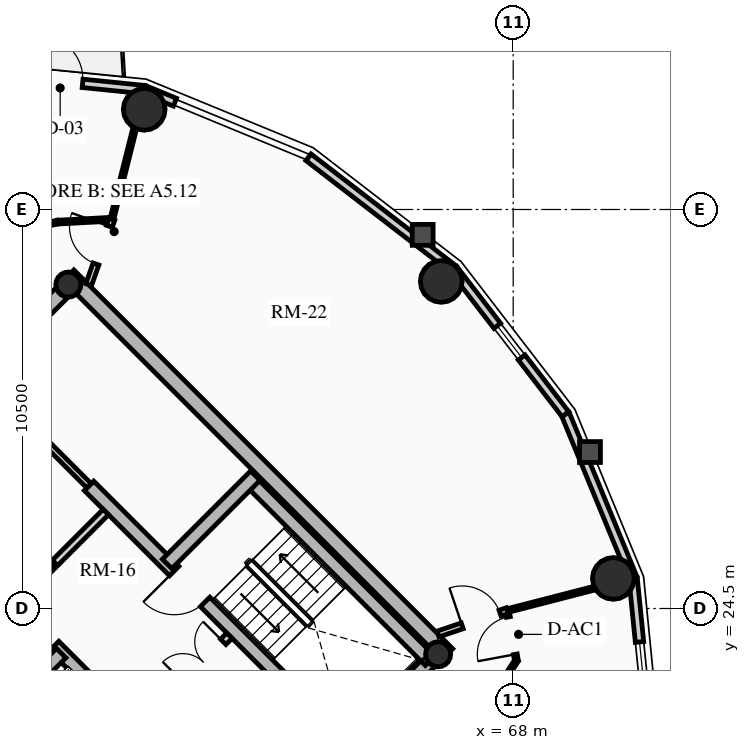
"""IFC4 building model, lengths in metres.
Left out: names, types, materials, properties, quantities, classifications, styles, units other than length and angle.
Written with IfcOpenShell. Run it as: python <this file> out.ifc"""

import sys

from ifc_helpers import new_model, si_unit, direction, frame, frame_2d, origin, origin_2d, place, context, subcontext, project, spatial, rectangle, circle, hollow_circle, extrude, source, transform, mapped, element, fill, save


model = new_model("IFC4")
c1 = context("Model", 3, precision=1e-05, world=origin(), true_north=direction((0.0, 1.0)))
c2 = subcontext(c1, "Body", "Model", "MODEL_VIEW")
j1 = project(units=[si_unit("LENGTHUNIT", "METRE"), si_unit("PLANEANGLEUNIT", "RADIAN")], contexts=[c1])
p1 = place(None, origin())
s1 = spatial("IfcSite", under=j1, at=p1, CompositionType="ELEMENT")
p2 = place(p1, origin())
s2 = spatial("IfcBuilding", under=s1, at=p2, CompositionType="ELEMENT")
p3 = place(p2, frame((0.0, 0.0, 199.57)))
s3 = spatial("IfcBuildingStorey", under=s2, at=p3, CompositionType="ELEMENT", Elevation=199.57)
for number, where, z_axis, x_axis in (
    (1, (58.702, 15.732, 0.0), (0.0, 0.0, 1.0), (-0.707, 0.707, 0.0)),
    (2, (66.268, 23.298, 0.0), (0.0, 0.0, 1.0), (-0.707, 0.707, 0.0)),
):
    element("IfcWall", number, at=place(p3, frame(where, z_axis=z_axis, x_axis=x_axis)), inside=s3, PredefinedType="SHEAR", context=c2, shape_type="SweptSolid", body=[
        extrude(rectangle(XDim=14.1, YDim=0.4, at=frame_2d((7.05, 0.0))), origin(), (0.0, 0.0, 1.0), 2.91),
    ])
p4 = place(p3, frame((58.561, 15.873, 0.0), z_axis=(0.0, 0.0, 1.0), x_axis=(0.707106781187, 0.707106781187, 0.0)))
e3 = element("IfcWall", 3, at=p4, inside=s3, PredefinedType="SHEAR", context=c2, shape_type="SweptSolid", body=[
    extrude(rectangle(XDim=10.7, YDim=0.4, at=frame_2d((5.35, 0.0))), origin(), (0.0, 0.0, 1.0), 2.91),
])
m1 = source(origin(), c2, "Body", "SweptSolid", [
    extrude(rectangle(XDim=1.5, YDim=2.02, at=frame_2d((0.75, 1.01))), frame((0.0, 0.21, 0.0), z_axis=(0.0, -1.0, 0.0), x_axis=(1.0, 0.0, 0.0)), (0.0, 0.0, 1.0), 0.42),
])
p5 = place(p4, frame((5.45, 0.0, 0.0)))
e4 = element("IfcOpeningElement", 4, at=p5, cuts=e3, PredefinedType="OPENING", context=c2, shape_type="MappedRepresentation", body=[
    mapped(m1, transform((0.0, 0.0, 0.0), x_axis=(1.0, 0.0, 0.0), y_axis=(0.0, 1.0, 0.0), z_axis=(0.0, 0.0, 1.0), scale=1.0)),
])
p6 = place(p3, frame((48.873, 25.561, 0.0), z_axis=(0.0, 0.0, 1.0), x_axis=(0.707106781187, 0.707106781187, 0.0)))
e5 = element("IfcWall", 5, at=p6, inside=s3, PredefinedType="SHEAR", context=c2, shape_type="SweptSolid", body=[
    extrude(rectangle(XDim=10.7, YDim=0.4, at=frame_2d((5.35, 0.0))), origin(), (0.0, 0.0, 1.0), 2.91),
])
p7 = place(p6, frame((4.6, 0.0, 0.0)))
e6 = element("IfcOpeningElement", 6, at=p7, cuts=e5, PredefinedType="OPENING", context=c2, shape_type="MappedRepresentation", body=[
    mapped(m1, transform((0.0, 0.0, 0.0), x_axis=(1.0, 0.0, 0.0), y_axis=(0.0, 1.0, 0.0), z_axis=(0.0, 0.0, 1.0), scale=1.0)),
])
p8 = place(p3, frame((61.06, 18.373, 0.0), z_axis=(0.0, 0.0, 1.0), x_axis=(-0.707106781187, 0.707106781187, 0.0)))
e7 = element("IfcWall", 7, at=p8, inside=s3, PredefinedType="SHEAR", context=c2, shape_type="SweptSolid", body=[
    extrude(rectangle(XDim=13.7, YDim=0.35, at=frame_2d((6.85, 0.0))), origin(), (0.0, 0.0, 1.0), 2.91),
])
m2 = source(origin(), c2, "Body", "SweptSolid", [
    extrude(rectangle(XDim=1.1, YDim=2.015, at=frame_2d((0.55, 1.007))), frame((0.0, 0.185, 0.0), z_axis=(0.0, -1.0, 0.0), x_axis=(1.0, 0.0, 0.0)), (0.0, 0.0, 1.0), 0.37),
])
p9 = place(p8, frame((4.85, 0.0, 0.0)))
e8 = element("IfcOpeningElement", 8, at=p9, cuts=e7, PredefinedType="OPENING", context=c2, shape_type="MappedRepresentation", body=[
    mapped(m2, transform((0.0, 0.0, 0.0), x_axis=(1.0, 0.0, 0.0), y_axis=(0.0, 1.0, 0.0), z_axis=(0.0, 0.0, 1.0), scale=1.0)),
])
p10 = place(p8, frame((0.625, 0.0, 0.0)))
e9 = element("IfcOpeningElement", 9, at=p10, cuts=e7, PredefinedType="OPENING", context=c2, shape_type="MappedRepresentation", body=[
    mapped(m2, transform((0.0, 0.0, 0.0), x_axis=(1.0, 0.0, 0.0), y_axis=(0.0, 1.0, 0.0), z_axis=(0.0, 0.0, 1.0), scale=1.0)),
])
p11 = place(p8, frame((2.625, 0.0, 0.0)))
e10 = element("IfcOpeningElement", 10, at=p11, cuts=e7, PredefinedType="OPENING", context=c2, shape_type="MappedRepresentation", body=[
    mapped(m2, transform((0.0, 0.0, 0.0), x_axis=(1.0, 0.0, 0.0), y_axis=(0.0, 1.0, 0.0), z_axis=(0.0, 0.0, 1.0), scale=1.0)),
])
m3 = source(origin(), c2, "Body", "SweptSolid", [
    extrude(rectangle(XDim=1.15, YDim=2.02, at=frame_2d((0.575, 1.01))), frame((0.0, 0.185, 0.0), z_axis=(0.0, -1.0, 0.0), x_axis=(1.0, 0.0, 0.0)), (0.0, 0.0, 1.0), 0.37),
])
p12 = place(p8, frame((7.27, 0.0, 0.0)))
e11 = element("IfcOpeningElement", 11, at=p12, cuts=e7, PredefinedType="OPENING", context=c2, shape_type="MappedRepresentation", body=[
    mapped(m3, transform((0.0, 0.0, 0.0), x_axis=(1.0, 0.0, 0.0), y_axis=(0.0, 1.0, 0.0), z_axis=(0.0, 0.0, 1.0), scale=1.0)),
])
p13 = place(p3, frame((63.627, 20.94, 0.0), z_axis=(0.0, 0.0, 1.0), x_axis=(-0.707119496762, 0.707094065383, 0.0)))
e12 = element("IfcWall", 12, at=p13, inside=s3, PredefinedType="SHEAR", context=c2, shape_type="SweptSolid", body=[
    extrude(rectangle(XDim=9.6, YDim=0.35, at=frame_2d((4.8, 0.0))), origin(), (0.0, 0.0, 1.0), 2.91),
])
p14 = place(p13, frame((5.28, 0.0, 0.0)))
e13 = element("IfcOpeningElement", 13, at=p14, cuts=e12, PredefinedType="OPENING", context=c2, shape_type="MappedRepresentation", body=[
    mapped(m3, transform((0.0, 0.0, 0.0), x_axis=(1.0, 0.0, 0.0), y_axis=(0.0, 1.0, 0.0), z_axis=(0.0, 0.0, 1.0), scale=1.0)),
])
p15 = place(p3, frame((53.784, 21.003, 0.0), z_axis=(0.0, 0.0, 1.0), x_axis=(0.707106781187, 0.707106781187, 0.0)))
e14 = element("IfcWall", 14, at=p15, inside=s3, PredefinedType="SHEAR", context=c2, shape_type="SweptSolid", body=[
    extrude(rectangle(XDim=3.285, YDim=0.35, at=frame_2d((1.643, 0.0))), origin(), (0.0, 0.0, 1.0), 2.91),
])
p16 = place(p3, frame((65.812, 23.125, 0.0), z_axis=(0.0, 0.0, 1.0), x_axis=(-0.707106781187, 0.707106781187, 0.0)))
e15 = element("IfcWall", 15, at=p16, inside=s3, PredefinedType="SHEAR", context=c2, shape_type="SweptSolid", body=[
    extrude(rectangle(XDim=6.695, YDim=0.35, at=frame_2d((3.348, 0.0))), origin(), (0.0, 0.0, 1.0), 2.91),
])
p17 = place(p3, frame((58.893, 25.674, 0.0), z_axis=(0.0, 0.0, 1.0), x_axis=(0.707106781187, 0.707106781187, 0.0)))
e16 = element("IfcWall", 16, at=p17, inside=s3, PredefinedType="SHEAR", context=c2, shape_type="SweptSolid", body=[
    extrude(rectangle(XDim=3.285, YDim=0.35, at=frame_2d((1.643, 0.0))), origin(), (0.0, 0.0, 1.0), 2.91),
])
for number, where, z_axis, x_axis in (
    (17, (66.024, 23.294, 0.0), (0.0, 0.0, 1.0), (0.707, 0.707, 0.0)),
    (18, (56.294, 33.024, 0.0), (0.0, 0.0, 1.0), (0.707, 0.707, 0.0)),
):
    element("IfcColumn", number, at=place(p3, frame(where, z_axis=z_axis, x_axis=x_axis)), inside=s3, PredefinedType="COLUMN", context=c2, shape_type="SweptSolid", body=[
        extrude(hollow_circle(Radius=0.33, WallThickness=0.025, at=origin_2d()), origin(), (0.0, 0.0, 1.0), 2.91),
    ])
for number, where, z_axis, x_axis in (
    (19, (66.107, 33.107, 0.0), (0.0, 0.0, 1.0), (1.0, 0.0, 0.0)),
    (20, (58.291, 37.635, 0.0), (0.0, 0.0, 1.0), (1.0, 0.0, 0.0)),
    (21, (70.635, 25.291, 0.0), (0.0, 0.0, 1.0), (1.0, 0.0, 0.0)),
):
    element("IfcColumn", number, at=place(p3, frame(where, z_axis=z_axis, x_axis=x_axis)), inside=s3, PredefinedType="USERDEFINED", context=c2, shape_type="SweptSolid", body=[
        extrude(circle(Radius=0.55, at=origin_2d()), origin(), (0.0, 0.0, 1.0), 2.91),
    ])
p18 = place(p3, frame((62.613, 36.374, 0.0), z_axis=(0.0, 0.0, 1.0), x_axis=(0.791998462147, -0.610523083886, 0.0)))
e22 = element("IfcWall", 22, at=p18, inside=s3, PredefinedType="SOLIDWALL", context=c2, shape_type="SweptSolid", body=[
    extrude(rectangle(XDim=4.82, YDim=0.22, at=frame_2d((2.41, 0.0))), origin(), (0.0, 0.0, 1.0), 2.322),
])
p19 = place(p3, frame((58.295, 38.155, 0.0), z_axis=(0.0, 0.0, 1.0), x_axis=(0.924515260676, -0.381145028536, 0.0)))
e23 = element("IfcWall", 23, at=p19, inside=s3, PredefinedType="SOLIDWALL", context=c2, shape_type="SweptSolid", body=[
    extrude(rectangle(XDim=0.87, YDim=0.22, at=frame_2d((0.435, 0.0))), origin(), (0.0, 0.0, 1.0), 2.322),
])
p20 = place(p3, frame((53.9, 38.599, 0.0), z_axis=(0.0, 0.0, 1.0), x_axis=(0.994929930991, -0.100570534541, 0.0)))
e24 = element("IfcWall", 24, at=p20, inside=s3, PredefinedType="SOLIDWALL", context=c2, shape_type="SweptSolid", body=[
    extrude(rectangle(XDim=4.418, YDim=0.22, at=frame_2d((2.209, 0.0))), origin(), (0.0, 0.0, 1.0), 2.322),
])
m4 = source(origin(), c2, "Body", "SweptSolid", [
    extrude(rectangle(XDim=1.15, YDim=2.005, at=frame_2d((0.575, 1.002))), frame((0.0, 0.12, 0.0), z_axis=(0.0, -1.0, 0.0), x_axis=(1.0, 0.0, 0.0)), (0.0, 0.0, 1.0), 0.24),
])
p21 = place(p20, frame((1.634, 0.0, 0.0)))
e25 = element("IfcOpeningElement", 25, at=p21, cuts=e24, PredefinedType="OPENING", context=c2, shape_type="MappedRepresentation", body=[
    mapped(m4, transform((0.0, 0.0, 0.0), x_axis=(1.0, 0.0, 0.0), y_axis=(0.0, 1.0, 0.0), z_axis=(0.0, 0.0, 1.0), scale=1.0)),
])
p22 = place(p3, frame((71.155, 25.295, 0.0), z_axis=(0.0, 0.0, 1.0), x_axis=(0.100570534541, -0.994929930991, 0.0)))
e26 = element("IfcWall", 26, at=p22, inside=s3, PredefinedType="SOLIDWALL", context=c2, shape_type="SweptSolid", body=[
    extrude(rectangle(XDim=4.418, YDim=0.22, at=frame_2d((2.209, 0.0))), origin(), (0.0, 0.0, 1.0), 2.322),
])
m5 = source(origin(), c2, "Body", "SweptSolid", [
    extrude(rectangle(XDim=1.05, YDim=1.3, at=frame_2d((0.525, 0.65))), frame((0.0, 0.12, 0.0), z_axis=(0.0, -1.0, 0.0), x_axis=(1.0, 0.0, 0.0)), (0.0, 0.0, 1.0), 0.24),
])
p23 = place(p22, frame((1.684, 0.0, 0.65)))
e27 = element("IfcOpeningElement", 27, at=p23, cuts=e26, PredefinedType="OPENING", context=c2, shape_type="MappedRepresentation", body=[
    mapped(m5, transform((0.0, 0.0, 0.0), x_axis=(1.0, 0.0, 0.0), y_axis=(0.0, 1.0, 0.0), z_axis=(0.0, 0.0, 1.0), scale=1.0)),
])
p24 = place(p3, frame((69.374, 29.613, 0.0), z_axis=(0.0, 0.0, 1.0), x_axis=(0.381309704956, -0.924447353237, 0.0)))
e28 = element("IfcWall", 28, at=p24, inside=s3, PredefinedType="SOLIDWALL", context=c2, shape_type="SweptSolid", body=[
    extrude(rectangle(XDim=4.671, YDim=0.22, at=frame_2d((2.335, 0.0))), origin(), (0.0, 0.0, 1.0), 2.322),
])
p25 = place(p3, frame((66.431, 33.431, 0.0), z_axis=(0.0, 0.0, 1.0), x_axis=(0.610523083886, -0.791998462147, 0.0)))
e29 = element("IfcWall", 29, at=p25, inside=s3, PredefinedType="SOLIDWALL", context=c2, shape_type="SweptSolid", body=[
    extrude(rectangle(XDim=4.82, YDim=0.22, at=frame_2d((2.41, 0.0))), origin(), (0.0, 0.0, 1.0), 2.322),
])
p26 = place(p25, frame((1.885, 0.0, 0.65)))
e30 = element("IfcOpeningElement", 30, at=p26, cuts=e29, PredefinedType="OPENING", context=c2, shape_type="MappedRepresentation", body=[
    mapped(m5, transform((0.0, 0.0, 0.0), x_axis=(1.0, 0.0, 0.0), y_axis=(0.0, 1.0, 0.0), z_axis=(0.0, 0.0, 1.0), scale=1.0)),
])
p27 = place(p3, frame((58.214, 21.467, 0.0), z_axis=(0.0, 0.0, 1.0), x_axis=(0.707106781187, 0.707106781187, 0.0)))
e31 = element("IfcWall", 31, at=p27, inside=s3, PredefinedType="PARTITIONING", context=c2, shape_type="SweptSolid", body=[
    extrude(rectangle(XDim=3.28, YDim=0.2, at=frame_2d((1.64, 0.0))), origin(), (0.0, 0.0, 1.0), 2.685),
])
m6 = source(origin(), c2, "Body", "SweptSolid", [
    extrude(rectangle(XDim=1.5, YDim=2.02, at=frame_2d((0.75, 1.01))), frame((0.0, 0.11, 0.0), z_axis=(0.0, -1.0, 0.0), x_axis=(1.0, 0.0, 0.0)), (0.0, 0.0, 1.0), 0.22),
])
p28 = place(p27, frame((1.55, 0.0, 0.0)))
e32 = element("IfcOpeningElement", 32, at=p28, cuts=e31, PredefinedType="OPENING", context=c2, shape_type="MappedRepresentation", body=[
    mapped(m6, transform((0.0, 0.0, 0.0), x_axis=(1.0, 0.0, 0.0), y_axis=(0.0, 1.0, 0.0), z_axis=(0.0, 0.0, 1.0), scale=1.0)),
])
p29 = place(p3, frame((54.961, 24.719, 0.0), z_axis=(0.0, 0.0, 1.0), x_axis=(0.707106781187, 0.707106781187, 0.0)))
e33 = element("IfcWall", 33, at=p29, inside=s3, PredefinedType="PARTITIONING", context=c2, shape_type="SweptSolid", body=[
    extrude(rectangle(XDim=3.28, YDim=0.2, at=frame_2d((1.64, 0.0))), origin(), (0.0, 0.0, 1.0), 2.685),
])
m7 = source(origin(), c2, "Body", "SweptSolid", [
    extrude(rectangle(XDim=0.9, YDim=2.005, at=frame_2d((0.45, 1.002))), frame((0.0, 0.11, 0.0), z_axis=(0.0, -1.0, 0.0), x_axis=(1.0, 0.0, 0.0)), (0.0, 0.0, 1.0), 0.22),
])
p30 = place(p29, frame((0.16, 0.0, 0.0)))
e34 = element("IfcOpeningElement", 34, at=p30, cuts=e33, PredefinedType="OPENING", context=c2, shape_type="MappedRepresentation", body=[
    mapped(m7, transform((0.0, 0.0, 0.0), x_axis=(1.0, 0.0, 0.0), y_axis=(0.0, 1.0, 0.0), z_axis=(0.0, 0.0, 1.0), scale=1.0)),
])
p31 = place(p3, frame((55.874, 25.631, 0.0), z_axis=(0.0, 0.0, 1.0), x_axis=(-0.707157639372, 0.707055919343, 0.0)))
e35 = element("IfcWall", 35, at=p31, inside=s3, PredefinedType="PARTITIONING", context=c2, shape_type="SweptSolid", body=[
    extrude(rectangle(XDim=2.4, YDim=0.2, at=frame_2d((1.2, 0.0))), origin(), (0.0, 0.0, 1.0), 2.685),
])
p32 = place(p3, frame((56.839, 27.728, 0.0), z_axis=(0.0, 0.0, 1.0), x_axis=(-0.707106781187, 0.707106781187, 0.0)))
e36 = element("IfcWall", 36, at=p32, inside=s3, PredefinedType="PARTITIONING", context=c2, shape_type="SweptSolid", body=[
    extrude(rectangle(XDim=3.9, YDim=0.16, at=frame_2d((1.95, 0.0))), origin(), (0.0, 0.0, 1.0), 2.685),
])
m8 = source(origin(), c2, "Body", "SweptSolid", [
    extrude(rectangle(XDim=0.9, YDim=2.005, at=frame_2d((0.45, 1.002))), frame((0.0, 0.09, 0.0), z_axis=(0.0, -1.0, 0.0), x_axis=(1.0, 0.0, 0.0)), (0.0, 0.0, 1.0), 0.18),
])
p33 = place(p32, frame((2.2, 0.0, 0.0)))
e37 = element("IfcOpeningElement", 37, at=p33, cuts=e36, PredefinedType="OPENING", context=c2, shape_type="MappedRepresentation", body=[
    mapped(m8, transform((0.0, 0.0, 0.0), x_axis=(1.0, 0.0, 0.0), y_axis=(0.0, 1.0, 0.0), z_axis=(0.0, 0.0, 1.0), scale=1.0)),
])
p34 = place(p3, frame((57.44, 34.744, 0.0), z_axis=(0.0, 0.0, 1.0), x_axis=(-0.998578025565, -0.053309725738, 0.0)))
e38 = element("IfcWall", 38, at=p34, inside=s3, PredefinedType="MOVABLE", context=c2, shape_type="SweptSolid", body=[
    extrude(rectangle(XDim=1.433, YDim=0.1, at=frame_2d((0.717, 0.0))), origin(), (0.0, 0.0, 1.0), 2.322),
])
p35 = place(p3, frame((56.009, 34.667, 0.0), z_axis=(0.0, 0.0, 1.0), x_axis=(-0.977625498152, -0.210353001795, 0.0)))
e39 = element("IfcWall", 39, at=p35, inside=s3, PredefinedType="MOVABLE", context=c2, shape_type="SweptSolid", body=[
    extrude(rectangle(XDim=1.538, YDim=0.1, at=frame_2d((0.769, 0.0))), origin(), (0.0, 0.0, 1.0), 2.255),
])
p36 = place(p3, frame((67.095, 21.6, 0.0), z_axis=(0.0, 0.0, 1.0), x_axis=(0.543773190184, 0.839232219137, 0.0)))
e40 = element("IfcWall", 40, at=p36, inside=s3, PredefinedType="MOVABLE", context=c2, shape_type="SweptSolid", body=[
    extrude(rectangle(XDim=1.823, YDim=0.1, at=frame_2d((0.911, 0.0))), origin(), (0.0, 0.0, 1.0), 2.255),
])
p37 = place(p3, frame((68.086, 23.129, 0.0), z_axis=(0.0, 0.0, 1.0), x_axis=(-0.182004193146, 0.983297754334, 0.0)))
e41 = element("IfcWall", 41, at=p37, inside=s3, PredefinedType="MOVABLE", context=c2, shape_type="SweptSolid", body=[
    extrude(rectangle(XDim=1.336, YDim=0.1, at=frame_2d((0.668, 0.0))), origin(), (0.0, 0.0, 1.0), 2.322),
])
m9 = source(origin(), c2, "Body", "SweptSolid", [
    extrude(rectangle(XDim=1.0, YDim=2.015, at=frame_2d((0.5, 1.007))), frame((0.0, 0.06, 0.0), z_axis=(0.0, -1.0, 0.0), x_axis=(1.0, 0.0, 0.0)), (0.0, 0.0, 1.0), 0.12),
])
p38 = place(p37, frame((0.168, 0.0, 0.0)))
e42 = element("IfcOpeningElement", 42, at=p38, cuts=e41, PredefinedType="OPENING", context=c2, shape_type="MappedRepresentation", body=[
    mapped(m9, transform((0.0, 0.0, 0.0), x_axis=(1.0, 0.0, 0.0), y_axis=(0.0, 1.0, 0.0), z_axis=(0.0, 0.0, 1.0), scale=1.0)),
])
p39 = place(p3, frame((57.44, 34.744, 0.0), z_axis=(0.0, 0.0, 1.0), x_axis=(0.243619816457, 0.969870808422, 0.0)))
e43 = element("IfcWall", 43, at=p39, inside=s3, PredefinedType="MOVABLE", context=c2, shape_type="SweptSolid", body=[
    extrude(rectangle(XDim=3.496, YDim=0.1, at=frame_2d((1.748, 0.0))), origin(), (0.0, 0.0, 1.0), 2.322),
])
p40 = place(p3, frame((67.843, 24.443, 0.0), z_axis=(0.0, 0.0, 1.0), x_axis=(0.968303102463, 0.249778105048, 0.0)))
e44 = element("IfcWall", 44, at=p40, inside=s3, PredefinedType="MOVABLE", context=c2, shape_type="SweptSolid", body=[
    extrude(rectangle(XDim=3.399, YDim=0.1, at=frame_2d((1.7, 0.0))), origin(), (0.0, 0.0, 1.0), 2.322),
])
p41 = place(p3, frame((56.828, 33.021, 0.0), z_axis=(0.0, 0.0, 1.0), x_axis=(0.334788446034, 0.942293317605, 0.0)))
e45 = element("IfcWall", 45, at=p41, inside=s3, PredefinedType="PARTITIONING", context=c2, shape_type="SweptSolid", body=[
    extrude(rectangle(XDim=1.829, YDim=0.16, at=frame_2d((0.915, 0.0))), origin(), (0.0, 0.0, 1.0), 2.255),
])
m10 = source(origin(), c2, "Body", "SweptSolid", [
    extrude(rectangle(XDim=1.05, YDim=2.015, at=frame_2d((0.525, 1.007))), frame((0.0, 0.09, 0.0), z_axis=(0.0, -1.0, 0.0), x_axis=(1.0, 0.0, 0.0)), (0.0, 0.0, 1.0), 0.18),
])
p42 = place(p41, frame((0.579, 0.0, 0.0)))
e46 = element("IfcOpeningElement", 46, at=p42, cuts=e45, PredefinedType="OPENING", context=c2, shape_type="MappedRepresentation", body=[
    mapped(m10, transform((0.0, 0.0, 0.0), x_axis=(1.0, 0.0, 0.0), y_axis=(0.0, 1.0, 0.0), z_axis=(0.0, 0.0, 1.0), scale=1.0)),
])
p43 = place(p3, frame((66.021, 23.828, 0.0), z_axis=(0.0, 0.0, 1.0), x_axis=(0.947522075691, 0.319690344049, 0.0)))
e47 = element("IfcWall", 47, at=p43, inside=s3, PredefinedType="PARTITIONING", context=c2, shape_type="SweptSolid", body=[
    extrude(rectangle(XDim=1.924, YDim=0.16, at=frame_2d((0.962, 0.0))), origin(), (0.0, 0.0, 1.0), 2.255),
])
p44 = place(p43, frame((0.674, 0.0, 0.0)))
e48 = element("IfcOpeningElement", 48, at=p44, cuts=e47, PredefinedType="OPENING", context=c2, shape_type="MappedRepresentation", body=[
    mapped(m10, transform((0.0, 0.0, 0.0), x_axis=(1.0, 0.0, 0.0), y_axis=(0.0, 1.0, 0.0), z_axis=(0.0, 0.0, 1.0), scale=1.0)),
])
m11 = source(origin(), c2, "Body", "SweptSolid", [
    extrude(rectangle(XDim=1.15, YDim=2.005, at=frame_2d((0.575, 1.002))), frame((0.0, 0.025, 0.0), z_axis=(0.0, -1.0, 0.0), x_axis=(1.0, 0.0, 0.0)), (0.0, 0.0, 1.0), 0.05),
])
p45 = place(p21, origin())
e49 = element("IfcDoor", 49, at=p45, inside=s3, OperationType="SINGLE_SWING_LEFT", PredefinedType="DOOR", context=c2, shape_type="MappedRepresentation", body=[
    mapped(m11, transform((0.0, 0.0, 0.0), x_axis=(1.0, 0.0, 0.0), y_axis=(0.0, 1.0, 0.0), z_axis=(0.0, 0.0, 1.0), scale=1.0)),
])
fill(e25, e49)
m12 = source(origin(), c2, "Body", "SweptSolid", [
    extrude(rectangle(XDim=1.05, YDim=1.3, at=frame_2d((0.525, 0.65))), frame((0.0, 0.03, 0.0), z_axis=(0.0, -1.0, 0.0), x_axis=(1.0, 0.0, 0.0)), (0.0, 0.0, 1.0), 0.06),
])
p46 = place(p23, origin())
e50 = element("IfcWindow", 50, at=p46, inside=s3, PartitioningType="SINGLE_PANEL", PredefinedType="WINDOW", context=c2, shape_type="MappedRepresentation", body=[
    mapped(m12, transform((0.0, 0.0, 0.0), x_axis=(1.0, 0.0, 0.0), y_axis=(0.0, 1.0, 0.0), z_axis=(0.0, 0.0, 1.0), scale=1.0)),
])
fill(e27, e50)
p47 = place(p26, origin())
e51 = element("IfcWindow", 51, at=p47, inside=s3, PartitioningType="SINGLE_PANEL", PredefinedType="WINDOW", context=c2, shape_type="MappedRepresentation", body=[
    mapped(m12, transform((0.0, 0.0, 0.0), x_axis=(1.0, 0.0, 0.0), y_axis=(0.0, 1.0, 0.0), z_axis=(0.0, 0.0, 1.0), scale=1.0)),
])
fill(e30, e51)
m13 = source(origin(), c2, "Body", "SweptSolid", [
    extrude(rectangle(XDim=1.15, YDim=2.02, at=frame_2d((0.575, 1.01))), frame((0.0, 0.025, 0.0), z_axis=(0.0, -1.0, 0.0), x_axis=(1.0, 0.0, 0.0)), (0.0, 0.0, 1.0), 0.05),
])
p48 = place(p12, origin())
e52 = element("IfcDoor", 52, at=p48, inside=s3, OperationType="SINGLE_SWING_LEFT", PredefinedType="DOOR", context=c2, shape_type="MappedRepresentation", body=[
    mapped(m13, transform((0.0, 0.0, 0.0), x_axis=(1.0, 0.0, 0.0), y_axis=(0.0, 1.0, 0.0), z_axis=(0.0, 0.0, 1.0), scale=1.0)),
])
fill(e11, e52)
p49 = place(p14, origin())
e53 = element("IfcDoor", 53, at=p49, inside=s3, OperationType="SINGLE_SWING_RIGHT", PredefinedType="DOOR", context=c2, shape_type="MappedRepresentation", body=[
    mapped(m13, transform((0.0, 0.0, 0.0), x_axis=(1.0, 0.0, 0.0), y_axis=(0.0, 1.0, 0.0), z_axis=(0.0, 0.0, 1.0), scale=1.0)),
])
fill(e13, e53)
m14 = source(origin(), c2, "Body", "SweptSolid", [
    extrude(rectangle(XDim=1.5, YDim=2.02, at=frame_2d((0.75, 1.01))), frame((0.0, 0.025, 0.0), z_axis=(0.0, -1.0, 0.0), x_axis=(1.0, 0.0, 0.0)), (0.0, 0.0, 1.0), 0.05),
])
p50 = place(p28, origin())
e54 = element("IfcDoor", 54, at=p50, inside=s3, OperationType="DOUBLE_DOOR_SINGLE_SWING", PredefinedType="DOOR", context=c2, shape_type="MappedRepresentation", body=[
    mapped(m14, transform((0.0, 0.0, 0.0), x_axis=(1.0, 0.0, 0.0), y_axis=(0.0, 1.0, 0.0), z_axis=(0.0, 0.0, 1.0), scale=1.0)),
])
fill(e32, e54)
m15 = source(origin(), c2, "Body", "SweptSolid", [
    extrude(rectangle(XDim=1.05, YDim=2.015, at=frame_2d((0.525, 1.007))), frame((0.0, 0.025, 0.0), z_axis=(0.0, -1.0, 0.0), x_axis=(1.0, 0.0, 0.0)), (0.0, 0.0, 1.0), 0.05),
])
p51 = place(p42, origin())
e55 = element("IfcDoor", 55, at=p51, inside=s3, OperationType="SINGLE_SWING_RIGHT", PredefinedType="DOOR", context=c2, shape_type="MappedRepresentation", body=[
    mapped(m15, transform((0.0, 0.0, 0.0), x_axis=(1.0, 0.0, 0.0), y_axis=(0.0, 1.0, 0.0), z_axis=(0.0, 0.0, 1.0), scale=1.0)),
])
fill(e46, e55)
p52 = place(p44, origin())
e56 = element("IfcDoor", 56, at=p52, inside=s3, OperationType="SINGLE_SWING_LEFT", PredefinedType="DOOR", context=c2, shape_type="MappedRepresentation", body=[
    mapped(m15, transform((0.0, 0.0, 0.0), x_axis=(1.0, 0.0, 0.0), y_axis=(0.0, 1.0, 0.0), z_axis=(0.0, 0.0, 1.0), scale=1.0)),
])
fill(e48, e56)
m16 = source(origin(), c2, "Body", "SweptSolid", [
    extrude(rectangle(XDim=1.0, YDim=2.015, at=frame_2d((0.5, 1.007))), frame((0.0, 0.025, 0.0), z_axis=(0.0, -1.0, 0.0), x_axis=(1.0, 0.0, 0.0)), (0.0, 0.0, 1.0), 0.05),
])
p53 = place(p38, origin())
e57 = element("IfcDoor", 57, at=p53, inside=s3, OperationType="SINGLE_SWING_LEFT", PredefinedType="DOOR", context=c2, shape_type="MappedRepresentation", body=[
    mapped(m16, transform((0.0, 0.0, 0.0), x_axis=(1.0, 0.0, 0.0), y_axis=(0.0, 1.0, 0.0), z_axis=(0.0, 0.0, 1.0), scale=1.0)),
])
fill(e42, e57)
save(model, sys.argv[1])
